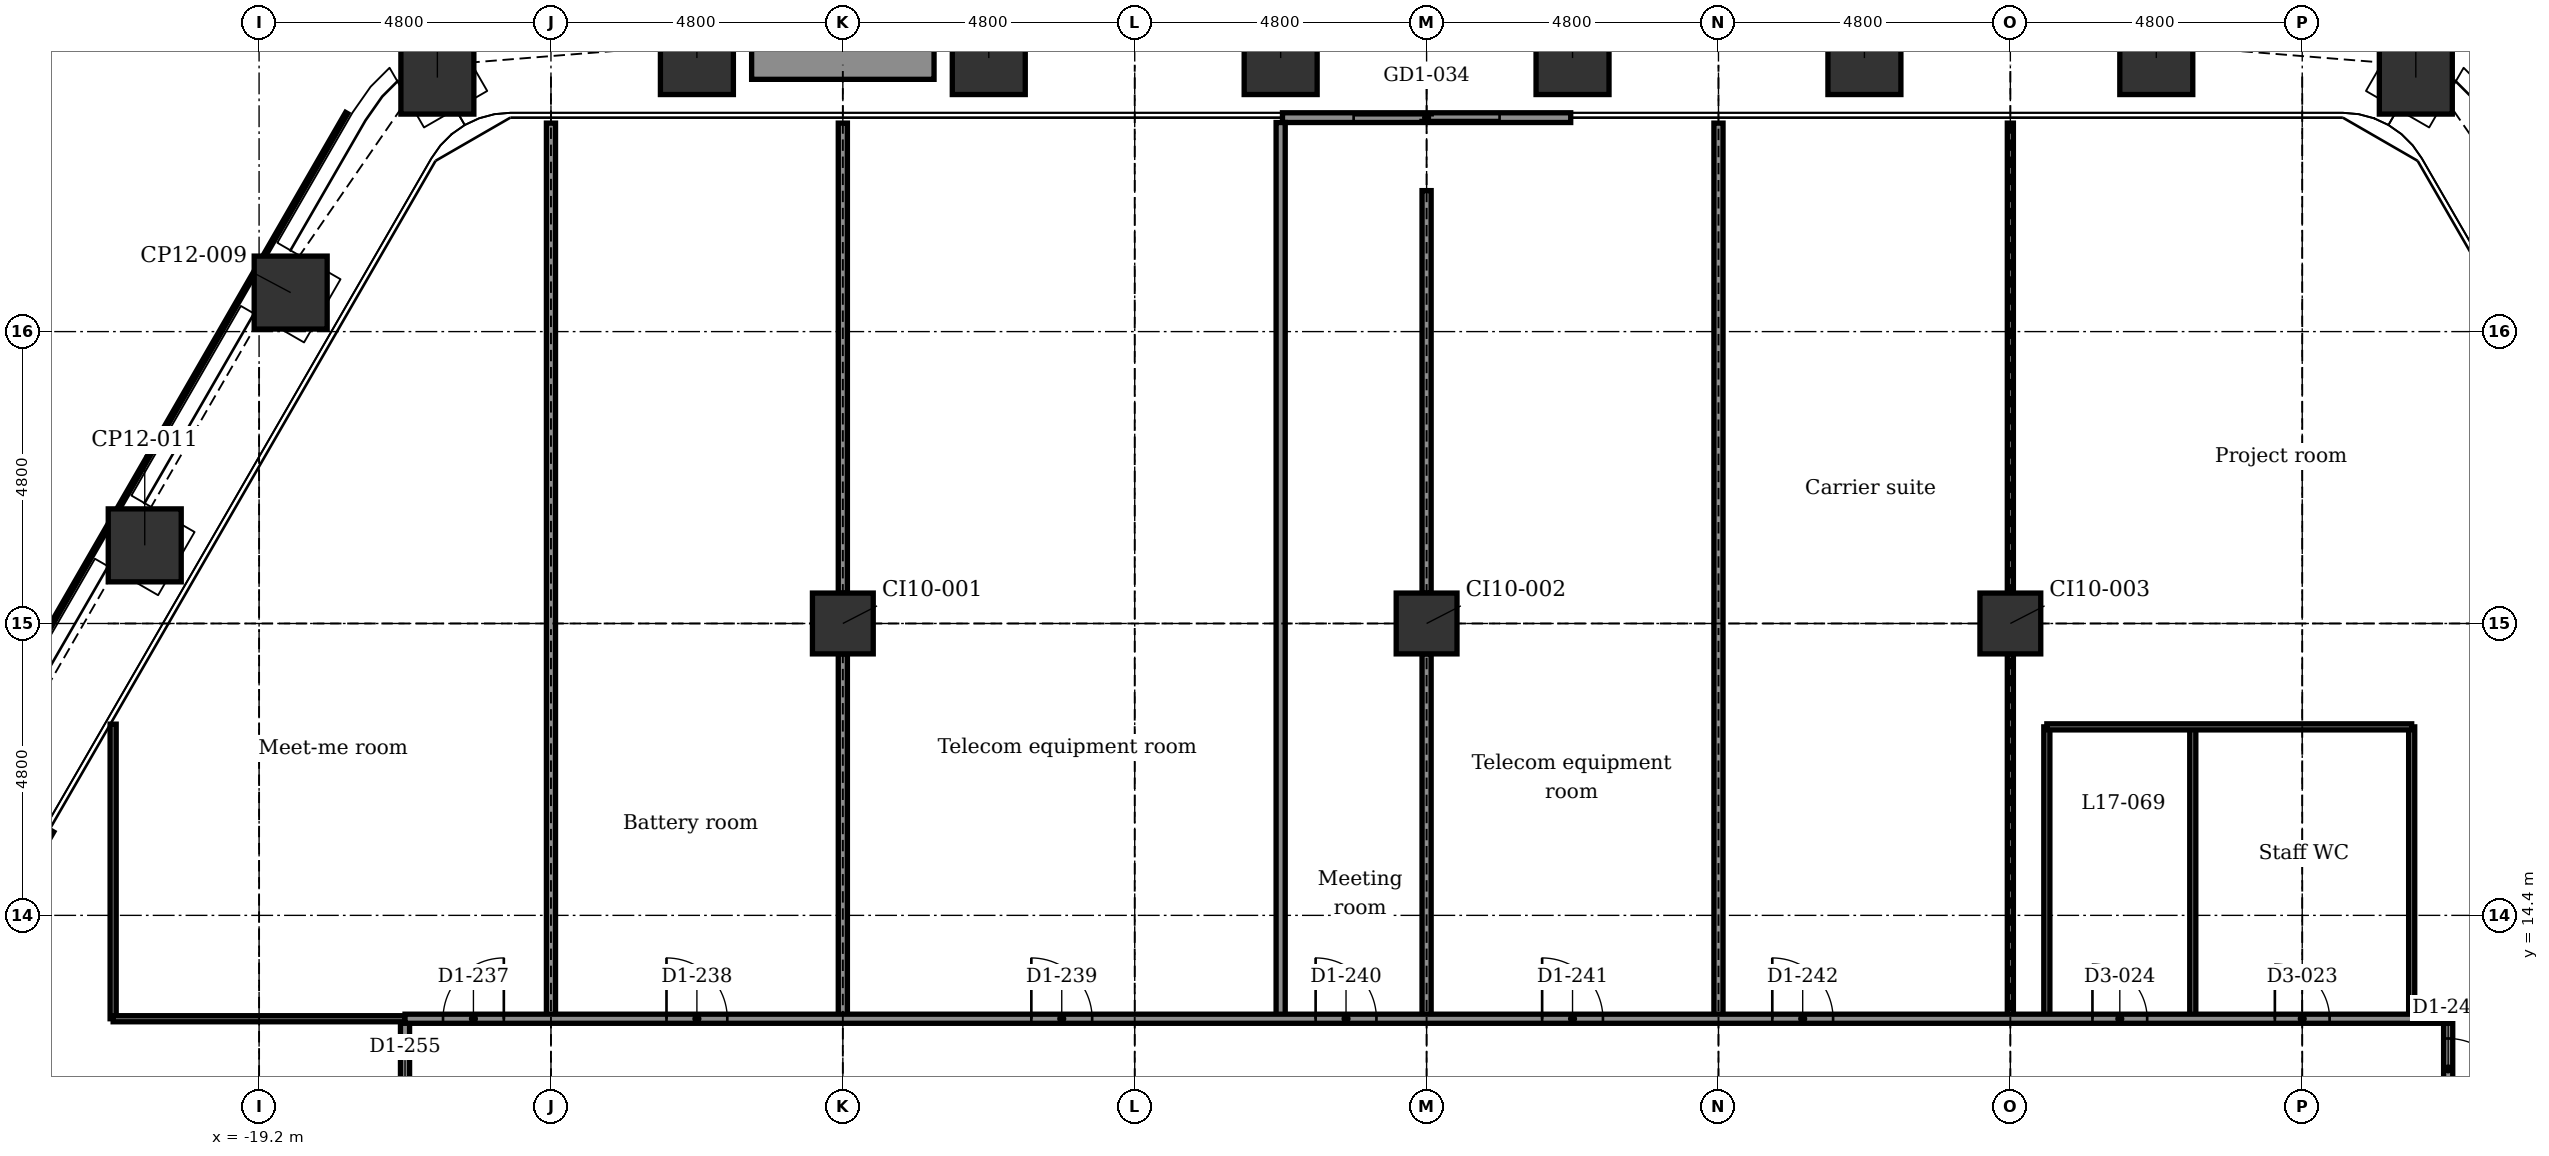
"""IFC4 building model, lengths in metres.
Left out: names, types, materials, properties, quantities, classifications, styles, units other than length and angle.
Written with IfcOpenShell. Run it as: python <this file> out.ifc"""

import sys

from ifc_helpers import new_model, si_unit, direction, frame, frame_2d, origin, origin_2d, place, context, subcontext, project, spatial, rectangle, extrude, element, fill, save


model = new_model("IFC4")
c1 = context("Model", 3, precision=1e-05, world=origin(), true_north=direction((0.0, 1.0)))
c2 = subcontext(c1, "Body", "Model", "MODEL_VIEW")
j1 = project(units=[si_unit("LENGTHUNIT", "METRE"), si_unit("PLANEANGLEUNIT", "RADIAN")], contexts=[c1])
p1 = place(None, origin())
s1 = spatial("IfcSite", under=j1, at=p1, CompositionType="ELEMENT")
p2 = place(p1, origin())
s2 = spatial("IfcBuilding", under=s1, at=p2, CompositionType="ELEMENT")
p3 = place(p2, frame((0.0, 0.0, 91.4)))
s3 = spatial("IfcBuildingStorey", under=s2, at=p3, CompositionType="ELEMENT", Elevation=91.4)
for number, where, z_axis, x_axis in (
    (1, (-16.268, 28.177, -0.2), (0.0, 0.0, 1.0), (0.866, 0.5, 0.0)),
    (2, (-12.0, 28.499, -0.2), (0.0, 0.0, 1.0), (1.0, 0.0, 0.0)),
    (3, (-7.2, 28.499, -0.2), (0.0, 0.0, 1.0), (1.0, 0.0, 0.0)),
    (4, (-2.4, 28.499, -0.2), (0.0, 0.0, 1.0), (1.0, 0.0, 0.0)),
    (5, (2.4, 28.499, -0.2), (0.0, 0.0, 1.0), (1.0, 0.0, 0.0)),
    (6, (7.2, 28.499, -0.2), (0.0, 0.0, 1.0), (1.0, 0.0, 0.0)),
    (7, (12.0, 28.499, -0.2), (0.0, 0.0, 1.0), (1.0, 0.0, 0.0)),
    (8, (16.268, 28.177, -0.2), (0.0, 0.0, 1.0), (0.5, 0.866, 0.0)),
    (9, (-21.08, 20.485, -0.2), (0.0, 0.0, 1.0), (0.5, 0.866, 0.0)),
    (10, (-18.68, 24.642, -0.2), (0.0, 0.0, 1.0), (0.5, 0.866, 0.0)),
):
    element("IfcColumn", number, at=place(p3, frame(where, z_axis=z_axis, x_axis=x_axis)), inside=s3, PredefinedType="COLUMN", context=c2, shape_type="SweptSolid", body=[
        extrude(rectangle(XDim=1.2, YDim=1.2, at=origin_2d()), origin(), (0.0, 0.0, 1.0), 4.5),
    ])
for number, where, z_axis, x_axis in (
    (11, (-9.6, 19.2, -0.2), (0.0, 0.0, 1.0), (1.0, 0.0, 0.0)),
    (12, (0.0, 19.2, -0.2), (0.0, 0.0, 1.0), (1.0, 0.0, 0.0)),
    (13, (9.6, 19.2, -0.2), (0.0, 0.0, 1.0), (1.0, 0.0, 0.0)),
):
    element("IfcColumn", number, at=place(p3, frame(where, z_axis=z_axis, x_axis=x_axis)), inside=s3, PredefinedType="COLUMN", context=c2, shape_type="SweptSolid", body=[
        extrude(rectangle(XDim=1.0, YDim=1.0, at=origin_2d()), origin(), (0.0, 0.0, 1.0), 4.5),
    ])
p4 = place(p3, frame((-2.37, 27.519, 0.0), z_axis=(0.0, 0.0, 1.0), x_axis=(1.0, 0.0, 0.0)))
e14 = element("IfcWall", 14, at=p4, inside=s3, PredefinedType="PARTITIONING", context=c2, shape_type="SweptSolid", body=[
    extrude(rectangle(XDim=4.74, YDim=0.16, at=frame_2d((2.37, 0.0))), origin(), (0.0, 0.0, 1.0), 4.3),
])
p5 = place(p4, frame((1.17, 0.0, 0.0)))
e15 = element("IfcOpeningElement", 15, at=p5, cuts=e14, PredefinedType="OPENING", context=c2, shape_type="SweptSolid", body=[
    extrude(rectangle(XDim=2.4, YDim=2.4, at=frame_2d((1.2, 1.2))), frame((0.0, 0.09, 0.0), z_axis=(0.0, -1.0, 0.0), x_axis=(1.0, 0.0, 0.0)), (0.0, 0.0, 1.0), 0.18),
])
p6 = place(p3, frame((-25.017, 11.707, 0.0), z_axis=(0.0, 0.0, 1.0), x_axis=(0.499978080042, 0.866038058908, 0.0)))
e16 = element("IfcWall", 16, at=p6, inside=s3, PredefinedType="PARTITIONING", context=c2, shape_type="SweptSolid", body=[
    extrude(rectangle(XDim=4.74, YDim=0.16, at=frame_2d((2.37, 0.0))), origin(), (0.0, 0.0, 1.0), 4.3),
])
p7 = place(p6, frame((1.17, 0.0, 0.0)))
e17 = element("IfcOpeningElement", 17, at=p7, cuts=e16, PredefinedType="OPENING", context=c2, shape_type="SweptSolid", body=[
    extrude(rectangle(XDim=2.4, YDim=2.4, at=frame_2d((1.2, 1.2))), frame((0.0, 0.09, 0.0), z_axis=(0.0, -1.0, 0.0), x_axis=(1.0, 0.0, 0.0)), (0.0, 0.0, 1.0), 0.18),
])
p8 = place(p3, frame((-11.1, 28.448, 0.0), z_axis=(0.0, 0.0, 1.0), x_axis=(1.0, 0.0, 0.0)))
e18 = element("IfcWall", 18, at=p8, inside=s3, PredefinedType="USERDEFINED", context=c2, shape_type="SweptSolid", body=[
    extrude(rectangle(XDim=3.0, YDim=0.6, at=frame_2d((1.5, 0.0))), origin(), (0.0, 0.0, 1.0), 0.7),
])
p9 = place(p3, frame((16.8, 3.95, 0.0), z_axis=(0.0, 0.0, 1.0), x_axis=(0.0, 1.0, 0.0)))
e19 = element("IfcWall", 19, at=p9, inside=s3, PredefinedType="PARTITIONING", context=c2, shape_type="SweptSolid", body=[
    extrude(rectangle(XDim=8.75, YDim=0.15, at=frame_2d((4.375, 0.0))), origin(), (0.0, 0.0, 1.0), 4.3),
])
p10 = place(p9, frame((7.425, 0.0, 0.0)))
e20 = element("IfcOpeningElement", 20, at=p10, cuts=e19, PredefinedType="OPENING", context=c2, shape_type="SweptSolid", body=[
    extrude(rectangle(XDim=1.0, YDim=2.1, at=frame_2d((0.5, 1.05))), frame((0.0, 0.085, 0.0), z_axis=(0.0, -1.0, 0.0), x_axis=(1.0, 0.0, 0.0)), (0.0, 0.0, 1.0), 0.17),
])
p11 = place(p9, frame((0.885, 0.0, 0.0)))
e21 = element("IfcOpeningElement", 21, at=p11, cuts=e19, PredefinedType="OPENING", context=c2, shape_type="SweptSolid", body=[
    extrude(rectangle(XDim=1.0, YDim=2.1, at=frame_2d((0.5, 1.05))), frame((0.0, 0.085, 0.0), z_axis=(0.0, -1.0, 0.0), x_axis=(1.0, 0.0, 0.0)), (0.0, 0.0, 1.0), 0.17),
])
for number, where, z_axis, x_axis in (
    (22, (16.2, 12.7, 0.0), (0.0, 0.0, 1.0), (0.0, 1.0, 0.0)),
    (23, (12.6, 12.7, 0.0), (0.0, 0.0, 1.0), (0.0, 1.0, 0.0)),
    (24, (10.2, 12.7, 0.0), (0.0, 0.0, 1.0), (0.0, 1.0, 0.0)),
):
    element("IfcWall", number, at=place(p3, frame(where, z_axis=z_axis, x_axis=x_axis)), inside=s3, PredefinedType="PARTITIONING", context=c2, shape_type="SweptSolid", body=[
        extrude(rectangle(XDim=4.8, YDim=0.1, at=frame_2d((2.4, 0.0))), origin(), (0.0, 0.0, 1.0), 4.3),
    ])
p12 = place(p3, frame((9.6, 12.7, 0.0), z_axis=(0.0, 0.0, 1.0), x_axis=(0.0, 1.0, 0.0)))
e25 = element("IfcWall", 25, at=p12, inside=s3, PredefinedType="PARTITIONING", context=c2, shape_type="SweptSolid", body=[
    extrude(rectangle(XDim=6.0, YDim=0.1, at=frame_2d((3.0, 0.0))), origin(), (0.0, 0.0, 1.0), 3.843),
])
p13 = place(p3, frame((9.6, 19.7, 0.0), z_axis=(0.0, 0.0, 1.0), x_axis=(0.0, 1.0, 0.0)))
e26 = element("IfcWall", 26, at=p13, inside=s3, PredefinedType="PARTITIONING", context=c2, shape_type="SweptSolid", body=[
    extrude(rectangle(XDim=7.729, YDim=0.1, at=frame_2d((3.864, 0.0))), origin(), (0.0, 0.0, 1.0), 3.843),
])
p14 = place(p3, frame((4.8, 12.7, 0.0), z_axis=(0.0, 0.0, 1.0), x_axis=(0.0, 1.0, 0.0)))
e27 = element("IfcWall", 27, at=p14, inside=s3, PredefinedType="PARTITIONING", context=c2, shape_type="SweptSolid", body=[
    extrude(rectangle(XDim=14.729, YDim=0.15, at=frame_2d((7.364, 0.0))), origin(), (0.0, 0.0, 1.0), 3.843),
])
p15 = place(p3, frame((0.0, 12.7, 0.0), z_axis=(0.0, 0.0, 1.0), x_axis=(0.0, 1.0, 0.0)))
e28 = element("IfcWall", 28, at=p15, inside=s3, PredefinedType="PARTITIONING", context=c2, shape_type="SweptSolid", body=[
    extrude(rectangle(XDim=6.0, YDim=0.15, at=frame_2d((3.0, 0.0))), origin(), (0.0, 0.0, 1.0), 3.843),
])
p16 = place(p3, frame((0.0, 19.7, 0.0), z_axis=(0.0, 0.0, 1.0), x_axis=(0.0, 1.0, 0.0)))
e29 = element("IfcWall", 29, at=p16, inside=s3, PredefinedType="PARTITIONING", context=c2, shape_type="SweptSolid", body=[
    extrude(rectangle(XDim=6.619, YDim=0.15, at=frame_2d((3.309, 0.0))), origin(), (0.0, 0.0, 1.0), 3.843),
])
p17 = place(p3, frame((-2.4, 12.7, 0.0), z_axis=(0.0, 0.0, 1.0), x_axis=(0.0, 1.0, 0.0)))
e30 = element("IfcWall", 30, at=p17, inside=s3, PredefinedType="PARTITIONING", context=c2, shape_type="SweptSolid", body=[
    extrude(rectangle(XDim=14.739, YDim=0.15, at=frame_2d((7.369, 0.0))), origin(), (0.0, 0.0, 1.0), 4.3),
])
p18 = place(p3, frame((-9.6, 12.7, 0.0), z_axis=(0.0, 0.0, 1.0), x_axis=(0.0, 1.0, 0.0)))
e31 = element("IfcWall", 31, at=p18, inside=s3, PredefinedType="PARTITIONING", context=c2, shape_type="SweptSolid", body=[
    extrude(rectangle(XDim=6.0, YDim=0.15, at=frame_2d((3.0, 0.0))), origin(), (0.0, 0.0, 1.0), 3.843),
])
p19 = place(p3, frame((-9.6, 19.7, 0.0), z_axis=(0.0, 0.0, 1.0), x_axis=(0.0, 1.0, 0.0)))
e32 = element("IfcWall", 32, at=p19, inside=s3, PredefinedType="PARTITIONING", context=c2, shape_type="SweptSolid", body=[
    extrude(rectangle(XDim=7.729, YDim=0.15, at=frame_2d((3.864, 0.0))), origin(), (0.0, 0.0, 1.0), 3.843),
])
p20 = place(p3, frame((-14.4, 12.7, 0.0), z_axis=(0.0, 0.0, 1.0), x_axis=(0.0, 1.0, 0.0)))
e33 = element("IfcWall", 33, at=p20, inside=s3, PredefinedType="PARTITIONING", context=c2, shape_type="SweptSolid", body=[
    extrude(rectangle(XDim=14.729, YDim=0.15, at=frame_2d((7.364, 0.0))), origin(), (0.0, 0.0, 1.0), 3.843),
])
p21 = place(p3, frame((-16.8, 3.95, 0.0), z_axis=(0.0, 0.0, 1.0), x_axis=(0.0, 1.0, 0.0)))
e34 = element("IfcWall", 34, at=p21, inside=s3, PredefinedType="PARTITIONING", context=c2, shape_type="SweptSolid", body=[
    extrude(rectangle(XDim=8.75, YDim=0.15, at=frame_2d((4.375, 0.0))), origin(), (0.0, 0.0, 1.0), 4.3),
])
p22 = place(p21, frame((1.25, 0.0, 0.0)))
e35 = element("IfcOpeningElement", 35, at=p22, cuts=e34, PredefinedType="OPENING", context=c2, shape_type="SweptSolid", body=[
    extrude(rectangle(XDim=1.0, YDim=2.1, at=frame_2d((0.5, 1.05))), frame((0.0, 0.085, 0.0), z_axis=(0.0, -1.0, 0.0), x_axis=(1.0, 0.0, 0.0)), (0.0, 0.0, 1.0), 0.17),
])
p23 = place(p21, frame((4.135, 0.0, 0.0)))
e36 = element("IfcOpeningElement", 36, at=p23, cuts=e34, PredefinedType="OPENING", context=c2, shape_type="SweptSolid", body=[
    extrude(rectangle(XDim=1.0, YDim=2.1, at=frame_2d((0.5, 1.05))), frame((0.0, 0.085, 0.0), z_axis=(0.0, -1.0, 0.0), x_axis=(1.0, 0.0, 0.0)), (0.0, 0.0, 1.0), 0.17),
])
p24 = place(p21, frame((6.78, 0.0, 0.0)))
e37 = element("IfcOpeningElement", 37, at=p24, cuts=e34, PredefinedType="OPENING", context=c2, shape_type="SweptSolid", body=[
    extrude(rectangle(XDim=1.0, YDim=2.1, at=frame_2d((0.5, 1.05))), frame((0.0, 0.085, 0.0), z_axis=(0.0, -1.0, 0.0), x_axis=(1.0, 0.0, 0.0)), (0.0, 0.0, 1.0), 0.17),
])
p25 = place(p3, frame((-21.6, 12.7, 0.0), z_axis=(0.0, 0.0, 1.0), x_axis=(0.0, 1.0, 0.0)))
e38 = element("IfcWall", 38, at=p25, inside=s3, PredefinedType="PARTITIONING", context=c2, shape_type="SweptSolid", body=[
    extrude(rectangle(XDim=4.845, YDim=0.1, at=frame_2d((2.422, 0.0))), origin(), (0.0, 0.0, 1.0), 4.3),
])
p26 = place(p3, frame((-21.6, 12.7, 0.0), z_axis=(0.0, 0.0, 1.0), x_axis=(1.0, 0.0, 0.0)))
e39 = element("IfcWall", 39, at=p26, inside=s3, PredefinedType="PARTITIONING", context=c2, shape_type="SweptSolid", body=[
    extrude(rectangle(XDim=4.8, YDim=0.1, at=frame_2d((2.4, 0.0))), origin(), (0.0, 0.0, 1.0), 4.3),
])
p27 = place(p3, frame((-16.8, 12.7, 0.0), z_axis=(0.0, 0.0, 1.0), x_axis=(1.0, 0.0, 0.0)))
e40 = element("IfcWall", 40, at=p27, inside=s3, PredefinedType="PARTITIONING", context=c2, shape_type="SweptSolid", body=[
    extrude(rectangle(XDim=33.6, YDim=0.15, at=frame_2d((16.8, 0.0))), origin(), (0.0, 0.0, 1.0), 4.3),
])
p28 = place(p27, frame((0.625, 0.0, 0.0)))
e41 = element("IfcOpeningElement", 41, at=p28, cuts=e40, PredefinedType="OPENING", context=c2, shape_type="SweptSolid", body=[
    extrude(rectangle(XDim=1.0, YDim=2.1, at=frame_2d((0.5, 1.05))), frame((0.0, 0.085, 0.0), z_axis=(0.0, -1.0, 0.0), x_axis=(1.0, 0.0, 0.0)), (0.0, 0.0, 1.0), 0.17),
])
p29 = place(p27, frame((4.3, 0.0, 0.0)))
e42 = element("IfcOpeningElement", 42, at=p29, cuts=e40, PredefinedType="OPENING", context=c2, shape_type="SweptSolid", body=[
    extrude(rectangle(XDim=1.0, YDim=2.1, at=frame_2d((0.5, 1.05))), frame((0.0, 0.085, 0.0), z_axis=(0.0, -1.0, 0.0), x_axis=(1.0, 0.0, 0.0)), (0.0, 0.0, 1.0), 0.17),
])
p30 = place(p27, frame((10.3, 0.0, 0.0)))
e43 = element("IfcOpeningElement", 43, at=p30, cuts=e40, PredefinedType="OPENING", context=c2, shape_type="SweptSolid", body=[
    extrude(rectangle(XDim=1.0, YDim=2.1, at=frame_2d((0.5, 1.05))), frame((0.0, 0.085, 0.0), z_axis=(0.0, -1.0, 0.0), x_axis=(1.0, 0.0, 0.0)), (0.0, 0.0, 1.0), 0.17),
])
p31 = place(p27, frame((14.975, 0.0, 0.0)))
e44 = element("IfcOpeningElement", 44, at=p31, cuts=e40, PredefinedType="OPENING", context=c2, shape_type="SweptSolid", body=[
    extrude(rectangle(XDim=1.0, YDim=2.1, at=frame_2d((0.5, 1.05))), frame((0.0, 0.085, 0.0), z_axis=(0.0, -1.0, 0.0), x_axis=(1.0, 0.0, 0.0)), (0.0, 0.0, 1.0), 0.17),
])
p32 = place(p27, frame((18.7, 0.0, 0.0)))
e45 = element("IfcOpeningElement", 45, at=p32, cuts=e40, PredefinedType="OPENING", context=c2, shape_type="SweptSolid", body=[
    extrude(rectangle(XDim=1.0, YDim=2.1, at=frame_2d((0.5, 1.05))), frame((0.0, 0.085, 0.0), z_axis=(0.0, -1.0, 0.0), x_axis=(1.0, 0.0, 0.0)), (0.0, 0.0, 1.0), 0.17),
])
p33 = place(p27, frame((22.485, 0.0, 0.0)))
e46 = element("IfcOpeningElement", 46, at=p33, cuts=e40, PredefinedType="OPENING", context=c2, shape_type="SweptSolid", body=[
    extrude(rectangle(XDim=1.0, YDim=2.1, at=frame_2d((0.5, 1.05))), frame((0.0, 0.085, 0.0), z_axis=(0.0, -1.0, 0.0), x_axis=(1.0, 0.0, 0.0)), (0.0, 0.0, 1.0), 0.17),
])
p34 = place(p27, frame((30.75, 0.0, 0.0)))
e47 = element("IfcOpeningElement", 47, at=p34, cuts=e40, PredefinedType="OPENING", context=c2, shape_type="SweptSolid", body=[
    extrude(rectangle(XDim=0.9, YDim=2.1, at=frame_2d((0.45, 1.05))), frame((0.0, 0.085, 0.0), z_axis=(0.0, -1.0, 0.0), x_axis=(1.0, 0.0, 0.0)), (0.0, 0.0, 1.0), 0.17),
])
p35 = place(p27, frame((27.75, 0.0, 0.0)))
e48 = element("IfcOpeningElement", 48, at=p35, cuts=e40, PredefinedType="OPENING", context=c2, shape_type="SweptSolid", body=[
    extrude(rectangle(XDim=0.9, YDim=2.1, at=frame_2d((0.45, 1.05))), frame((0.0, 0.085, 0.0), z_axis=(0.0, -1.0, 0.0), x_axis=(1.0, 0.0, 0.0)), (0.0, 0.0, 1.0), 0.17),
])
p36 = place(p3, frame((10.2, 17.5, 0.0), z_axis=(0.0, 0.0, 1.0), x_axis=(1.0, 0.0, 0.0)))
e49 = element("IfcWall", 49, at=p36, inside=s3, PredefinedType="PARTITIONING", context=c2, shape_type="SweptSolid", body=[
    extrude(rectangle(XDim=6.0, YDim=0.1, at=frame_2d((3.0, 0.0))), origin(), (0.0, 0.0, 1.0), 4.3),
])
p37 = place(p5, origin())
e50 = element("IfcDoor", 50, at=p37, inside=s3, OperationType="DOUBLE_DOOR_SLIDING", PredefinedType="DOOR", context=c2, shape_type="SweptSolid", body=[
    extrude(rectangle(XDim=2.4, YDim=2.4, at=frame_2d((1.2, 1.2))), frame((0.0, 0.025, 0.0), z_axis=(0.0, -1.0, 0.0), x_axis=(1.0, 0.0, 0.0)), (0.0, 0.0, 1.0), 0.05),
])
fill(e15, e50)
p38 = place(p28, origin())
e51 = element("IfcDoor", 51, at=p38, inside=s3, OperationType="SINGLE_SWING_RIGHT", PredefinedType="DOOR", context=c2, shape_type="SweptSolid", body=[
    extrude(rectangle(XDim=1.0, YDim=2.1, at=frame_2d((0.5, 1.05))), frame((0.0, 0.025, 0.0), z_axis=(0.0, -1.0, 0.0), x_axis=(1.0, 0.0, 0.0)), (0.0, 0.0, 1.0), 0.05),
])
fill(e41, e51)
p39 = place(p29, origin())
e52 = element("IfcDoor", 52, at=p39, inside=s3, OperationType="SINGLE_SWING_LEFT", PredefinedType="DOOR", context=c2, shape_type="SweptSolid", body=[
    extrude(rectangle(XDim=1.0, YDim=2.1, at=frame_2d((0.5, 1.05))), frame((0.0, 0.025, 0.0), z_axis=(0.0, -1.0, 0.0), x_axis=(1.0, 0.0, 0.0)), (0.0, 0.0, 1.0), 0.05),
])
fill(e42, e52)
p40 = place(p30, origin())
e53 = element("IfcDoor", 53, at=p40, inside=s3, OperationType="SINGLE_SWING_LEFT", PredefinedType="DOOR", context=c2, shape_type="SweptSolid", body=[
    extrude(rectangle(XDim=1.0, YDim=2.1, at=frame_2d((0.5, 1.05))), frame((0.0, 0.025, 0.0), z_axis=(0.0, -1.0, 0.0), x_axis=(1.0, 0.0, 0.0)), (0.0, 0.0, 1.0), 0.05),
])
fill(e43, e53)
p41 = place(p31, origin())
e54 = element("IfcDoor", 54, at=p41, inside=s3, OperationType="SINGLE_SWING_LEFT", PredefinedType="DOOR", context=c2, shape_type="SweptSolid", body=[
    extrude(rectangle(XDim=1.0, YDim=2.1, at=frame_2d((0.5, 1.05))), frame((0.0, 0.025, 0.0), z_axis=(0.0, -1.0, 0.0), x_axis=(1.0, 0.0, 0.0)), (0.0, 0.0, 1.0), 0.05),
])
fill(e44, e54)
p42 = place(p32, origin())
e55 = element("IfcDoor", 55, at=p42, inside=s3, OperationType="SINGLE_SWING_LEFT", PredefinedType="DOOR", context=c2, shape_type="SweptSolid", body=[
    extrude(rectangle(XDim=1.0, YDim=2.1, at=frame_2d((0.5, 1.05))), frame((0.0, 0.025, 0.0), z_axis=(0.0, -1.0, 0.0), x_axis=(1.0, 0.0, 0.0)), (0.0, 0.0, 1.0), 0.05),
])
fill(e45, e55)
p43 = place(p33, origin())
e56 = element("IfcDoor", 56, at=p43, inside=s3, OperationType="SINGLE_SWING_LEFT", PredefinedType="DOOR", context=c2, shape_type="SweptSolid", body=[
    extrude(rectangle(XDim=1.0, YDim=2.1, at=frame_2d((0.5, 1.05))), frame((0.0, 0.025, 0.0), z_axis=(0.0, -1.0, 0.0), x_axis=(1.0, 0.0, 0.0)), (0.0, 0.0, 1.0), 0.05),
])
fill(e46, e56)
p44 = place(p10, frame((1.0, 0.0, 0.0), z_axis=(0.0, 0.0, 1.0), x_axis=(-1.0, 0.0, 0.0)))
e57 = element("IfcDoor", 57, at=p44, inside=s3, OperationType="SINGLE_SWING_LEFT", PredefinedType="DOOR", context=c2, shape_type="SweptSolid", body=[
    extrude(rectangle(XDim=1.0, YDim=2.1, at=frame_2d((0.5, 1.05))), frame((0.0, 0.025, 0.0), z_axis=(0.0, -1.0, 0.0), x_axis=(1.0, 0.0, 0.0)), (0.0, 0.0, 1.0), 0.05),
])
fill(e20, e57)
p45 = place(p34, origin())
e58 = element("IfcDoor", 58, at=p45, inside=s3, OperationType="SINGLE_SWING_LEFT", PredefinedType="DOOR", context=c2, shape_type="SweptSolid", body=[
    extrude(rectangle(XDim=0.9, YDim=2.1, at=frame_2d((0.45, 1.05))), frame((0.0, 0.025, 0.0), z_axis=(0.0, -1.0, 0.0), x_axis=(1.0, 0.0, 0.0)), (0.0, 0.0, 1.0), 0.05),
])
fill(e47, e58)
p46 = place(p35, origin())
e59 = element("IfcDoor", 59, at=p46, inside=s3, OperationType="SINGLE_SWING_LEFT", PredefinedType="DOOR", context=c2, shape_type="SweptSolid", body=[
    extrude(rectangle(XDim=0.9, YDim=2.1, at=frame_2d((0.45, 1.05))), frame((0.0, 0.025, 0.0), z_axis=(0.0, -1.0, 0.0), x_axis=(1.0, 0.0, 0.0)), (0.0, 0.0, 1.0), 0.05),
])
fill(e48, e59)
save(model, sys.argv[1])
